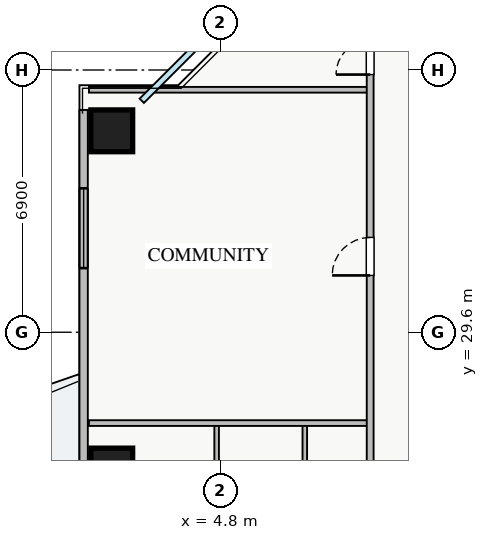
"""IFC4 building model, lengths in metres.
Left out: names, types, materials, properties, quantities, classifications, styles, units other than length and angle.
Written with IfcOpenShell. Run it as: python <this file> out.ifc"""

import sys

from ifc_helpers import new_model, si_unit, direction, frame, frame_2d, origin, origin_2d, place, context, subcontext, project, spatial, rectangle, extrude, source, transform, mapped, element, fill, save


model = new_model("IFC4")
c1 = context("Model", 3, precision=1e-05, world=origin(), true_north=direction((0.0, 1.0)))
c2 = subcontext(c1, "Body", "Model", "MODEL_VIEW")
j1 = project(units=[si_unit("LENGTHUNIT", "METRE"), si_unit("PLANEANGLEUNIT", "RADIAN")], contexts=[c1])
p1 = place(None, origin())
s1 = spatial("IfcSite", under=j1, at=p1, CompositionType="ELEMENT")
p2 = place(p1, origin())
s2 = spatial("IfcBuilding", under=s1, at=p2, CompositionType="ELEMENT")
p3 = place(p2, frame((0.0, 0.0, 106.75)))
s3 = spatial("IfcBuildingStorey", under=s2, at=p3, CompositionType="ELEMENT", Elevation=106.75)
m1 = source(origin(), c2, "Body", "SweptSolid", [
    extrude(rectangle(XDim=1.1, YDim=1.1, at=origin_2d()), origin(), (0.0, 0.0, 1.0), 3.25),
])
for number, where, z_axis, x_axis in (
    (1, (1.95, 34.9, 0.0), (0.0, 0.0, 1.0), (1.0, 0.0, 0.0)),
    (2, (1.95, 26.0, 0.0), (0.0, 0.0, 1.0), (1.0, 0.0, 0.0)),
):
    element("IfcColumn", number, at=place(p3, frame(where, z_axis=z_axis, x_axis=x_axis)), inside=s3, PredefinedType="COLUMN", context=c2, shape_type="MappedRepresentation", body=[
        mapped(m1, transform((0.0, 0.0, 0.0), x_axis=(1.0, 0.0, 0.0), y_axis=(0.0, 1.0, 0.0), z_axis=(0.0, 0.0, 1.0), scale=1.0)),
    ])
p4 = place(p3, frame((1.21, 10.55, 0.0), z_axis=(0.0, 0.0, 1.0), x_axis=(0.0, 1.0, 0.0)))
e3 = element("IfcWall", 3, at=p4, inside=s3, PredefinedType="STANDARD", context=c2, shape_type="SweptSolid", body=[
    extrude(rectangle(XDim=24.9, YDim=0.22, at=frame_2d((12.45, 0.0))), origin(), (0.0, 0.0, 1.0), 2.61),
])
p5 = place(p4, frame((13.3, 0.0, 0.0)))
e4 = element("IfcOpeningElement", 4, at=p5, cuts=e3, PredefinedType="OPENING", context=c2, shape_type="SweptSolid", body=[
    extrude(rectangle(XDim=1.2, YDim=2.1, at=frame_2d((0.6, 1.05))), frame((0.0, 0.12, 0.0), z_axis=(0.0, -1.0, 0.0), x_axis=(1.0, 0.0, 0.0)), (0.0, 0.0, 1.0), 0.24),
])
p6 = place(p4, frame((0.645, 0.0, 0.9)))
e5 = element("IfcOpeningElement", 5, at=p6, cuts=e3, PredefinedType="OPENING", context=c2, shape_type="SweptSolid", body=[
    extrude(rectangle(XDim=2.4, YDim=1.5, at=frame_2d((1.2, 0.75))), frame((0.0, 0.12, 0.0), z_axis=(0.0, -1.0, 0.0), x_axis=(1.0, 0.0, 0.0)), (0.0, 0.0, 1.0), 0.24),
])
p7 = place(p4, frame((20.737, 0.0, 0.9)))
e6 = element("IfcOpeningElement", 6, at=p7, cuts=e3, PredefinedType="OPENING", context=c2, shape_type="SweptSolid", body=[
    extrude(rectangle(XDim=2.1, YDim=1.48, at=frame_2d((1.05, 0.74))), frame((0.0, 0.12, 0.0), z_axis=(0.0, -1.0, 0.0), x_axis=(1.0, 0.0, 0.0)), (0.0, 0.0, 1.0), 0.24),
])
p8 = place(p4, frame((4.913, 0.0, 0.9)))
e7 = element("IfcOpeningElement", 7, at=p8, cuts=e3, PredefinedType="OPENING", context=c2, shape_type="SweptSolid", body=[
    extrude(rectangle(XDim=2.4, YDim=1.5, at=frame_2d((1.2, 0.75))), frame((0.0, 0.12, 0.0), z_axis=(0.0, -1.0, 0.0), x_axis=(1.0, 0.0, 0.0)), (0.0, 0.0, 1.0), 0.24),
])
p9 = place(p4, frame((14.72, 0.0, 0.9)))
e8 = element("IfcOpeningElement", 8, at=p9, cuts=e3, PredefinedType="OPENING", context=c2, shape_type="SweptSolid", body=[
    extrude(rectangle(XDim=0.9, YDim=1.2, at=frame_2d((0.45, 0.6))), frame((0.0, 0.12, 0.0), z_axis=(0.0, -1.0, 0.0), x_axis=(1.0, 0.0, 0.0)), (0.0, 0.0, 1.0), 0.24),
])
p10 = place(p4, frame((8.815, 0.0, 0.9)))
e9 = element("IfcOpeningElement", 9, at=p10, cuts=e3, PredefinedType="OPENING", context=c2, shape_type="SweptSolid", body=[
    extrude(rectangle(XDim=0.9, YDim=1.2, at=frame_2d((0.45, 0.6))), frame((0.0, 0.12, 0.0), z_axis=(0.0, -1.0, 0.0), x_axis=(1.0, 0.0, 0.0)), (0.0, 0.0, 1.0), 0.24),
])
p11 = place(p3, frame((1.35, 35.98, 0.0), z_axis=(0.0, 0.0, 1.0), x_axis=(1.0, 0.0, 0.0)))
e10 = element("IfcWall", 10, at=p11, inside=s3, PredefinedType="PARTITIONING", context=c2, shape_type="SweptSolid", body=[
    extrude(rectangle(XDim=7.4, YDim=0.15, at=frame_2d((3.7, 0.0))), origin(), (0.0, 0.0, 1.0), 3.07),
])
for number, where, z_axis, x_axis in (
    (11, (4.71, 23.01, 0.0), (0.0, 0.0, 1.0), (0.0, 1.0, 0.0)),
    (12, (7.03, 23.01, 0.0), (0.0, 0.0, 1.0), (0.0, 1.0, 0.0)),
):
    element("IfcWall", number, at=place(p3, frame(where, z_axis=z_axis, x_axis=x_axis)), inside=s3, PredefinedType="PLUMBINGWALL", context=c2, shape_type="SweptSolid", body=[
        extrude(rectangle(XDim=4.2, YDim=0.12, at=frame_2d((2.1, 0.0))), origin(), (0.0, 0.0, 1.0), 3.07),
    ])
p12 = place(p3, frame((1.35, 27.21, 0.0), z_axis=(0.0, 0.0, 1.0), x_axis=(1.0, 0.0, 0.0)))
e13 = element("IfcWall", 13, at=p12, inside=s3, PredefinedType="PARTITIONING", context=c2, shape_type="SweptSolid", body=[
    extrude(rectangle(XDim=7.4, YDim=0.15, at=frame_2d((3.7, 0.0))), origin(), (0.0, 0.0, 1.0), 3.07),
])
p13 = place(p3, frame((8.75, 8.3, 0.0), z_axis=(0.0, 0.0, 1.0), x_axis=(0.0, 1.0, 0.0)))
e14 = element("IfcWall", 14, at=p13, inside=s3, PredefinedType="PARTITIONING", context=c2, shape_type="SweptSolid", body=[
    extrude(rectangle(XDim=29.4, YDim=0.18, at=frame_2d((14.7, 0.0))), origin(), (0.0, 0.0, 1.0), 3.07),
])
p14 = place(p13, frame((28.08, 0.0, 0.0)))
e15 = element("IfcOpeningElement", 15, at=p14, cuts=e14, PredefinedType="OPENING", context=c2, shape_type="SweptSolid", body=[
    extrude(rectangle(XDim=0.9, YDim=2.05, at=frame_2d((0.45, 1.025))), frame((0.0, 0.1, 0.0), z_axis=(0.0, -1.0, 0.0), x_axis=(1.0, 0.0, 0.0)), (0.0, 0.0, 1.0), 0.2),
])
p15 = place(p13, frame((0.245, 0.0, 0.0)))
e16 = element("IfcOpeningElement", 16, at=p15, cuts=e14, PredefinedType="OPENING", context=c2, shape_type="SweptSolid", body=[
    extrude(rectangle(XDim=0.9, YDim=2.05, at=frame_2d((0.45, 1.025))), frame((0.0, 0.1, 0.0), z_axis=(0.0, -1.0, 0.0), x_axis=(1.0, 0.0, 0.0)), (0.0, 0.0, 1.0), 0.2),
])
p16 = place(p13, frame((2.95, 0.0, 0.0)))
e17 = element("IfcOpeningElement", 17, at=p16, cuts=e14, PredefinedType="OPENING", context=c2, shape_type="SweptSolid", body=[
    extrude(rectangle(XDim=1.0, YDim=2.05, at=frame_2d((0.5, 1.025))), frame((0.0, 0.1, 0.0), z_axis=(0.0, -1.0, 0.0), x_axis=(1.0, 0.0, 0.0)), (0.0, 0.0, 1.0), 0.2),
])
p17 = place(p13, frame((12.08, 0.0, 0.0)))
e18 = element("IfcOpeningElement", 18, at=p17, cuts=e14, PredefinedType="OPENING", context=c2, shape_type="SweptSolid", body=[
    extrude(rectangle(XDim=1.0, YDim=2.05, at=frame_2d((0.5, 1.025))), frame((0.0, 0.1, 0.0), z_axis=(0.0, -1.0, 0.0), x_axis=(1.0, 0.0, 0.0)), (0.0, 0.0, 1.0), 0.2),
])
p18 = place(p13, frame((22.795, 0.0, 0.0)))
e19 = element("IfcOpeningElement", 19, at=p18, cuts=e14, PredefinedType="OPENING", context=c2, shape_type="SweptSolid", body=[
    extrude(rectangle(XDim=1.0, YDim=2.05, at=frame_2d((0.5, 1.025))), frame((0.0, 0.1, 0.0), z_axis=(0.0, -1.0, 0.0), x_axis=(1.0, 0.0, 0.0)), (0.0, 0.0, 1.0), 0.2),
])
m2 = source(origin(), c2, "Body", "SweptSolid", [
    extrude(rectangle(XDim=2.1, YDim=1.48, at=frame_2d((1.05, 0.74))), frame((0.0, 0.03, 0.0), z_axis=(0.0, -1.0, 0.0), x_axis=(1.0, 0.0, 0.0)), (0.0, 0.0, 1.0), 0.06),
])
p19 = place(p7, origin())
e20 = element("IfcWindow", 20, at=p19, inside=s3, PartitioningType="TRIPLE_PANEL_VERTICAL", PredefinedType="WINDOW", context=c2, shape_type="MappedRepresentation", body=[
    mapped(m2, transform((0.0, 0.0, 0.0), x_axis=(1.0, 0.0, 0.0), y_axis=(0.0, 1.0, 0.0), z_axis=(0.0, 0.0, 1.0), scale=1.0)),
])
fill(e6, e20)
m3 = source(origin(), c2, "Body", "SweptSolid", [
    extrude(rectangle(XDim=0.9, YDim=2.05, at=frame_2d((0.45, 1.025))), frame((0.0, 0.025, 0.0), z_axis=(0.0, -1.0, 0.0), x_axis=(1.0, 0.0, 0.0)), (0.0, 0.0, 1.0), 0.05),
])
p20 = place(p14, origin())
e21 = element("IfcDoor", 21, at=p20, inside=s3, OperationType="SINGLE_SWING_LEFT", PredefinedType="DOOR", context=c2, shape_type="MappedRepresentation", body=[
    mapped(m3, transform((0.0, 0.0, 0.0), x_axis=(1.0, 0.0, 0.0), y_axis=(0.0, 1.0, 0.0), z_axis=(0.0, 0.0, 1.0), scale=1.0)),
])
fill(e15, e21)
m4 = source(origin(), c2, "Body", "SweptSolid", [
    extrude(rectangle(XDim=1.0, YDim=2.05, at=frame_2d((0.5, 1.025))), frame((0.0, 0.025, 0.0), z_axis=(0.0, -1.0, 0.0), x_axis=(1.0, 0.0, 0.0)), (0.0, 0.0, 1.0), 0.05),
])
p21 = place(p18, origin())
e22 = element("IfcDoor", 22, at=p21, inside=s3, OperationType="SINGLE_SWING_LEFT", PredefinedType="DOOR", context=c2, shape_type="MappedRepresentation", body=[
    mapped(m4, transform((0.0, 0.0, 0.0), x_axis=(1.0, 0.0, 0.0), y_axis=(0.0, 1.0, 0.0), z_axis=(0.0, 0.0, 1.0), scale=1.0)),
])
fill(e19, e22)
save(model, sys.argv[1])
